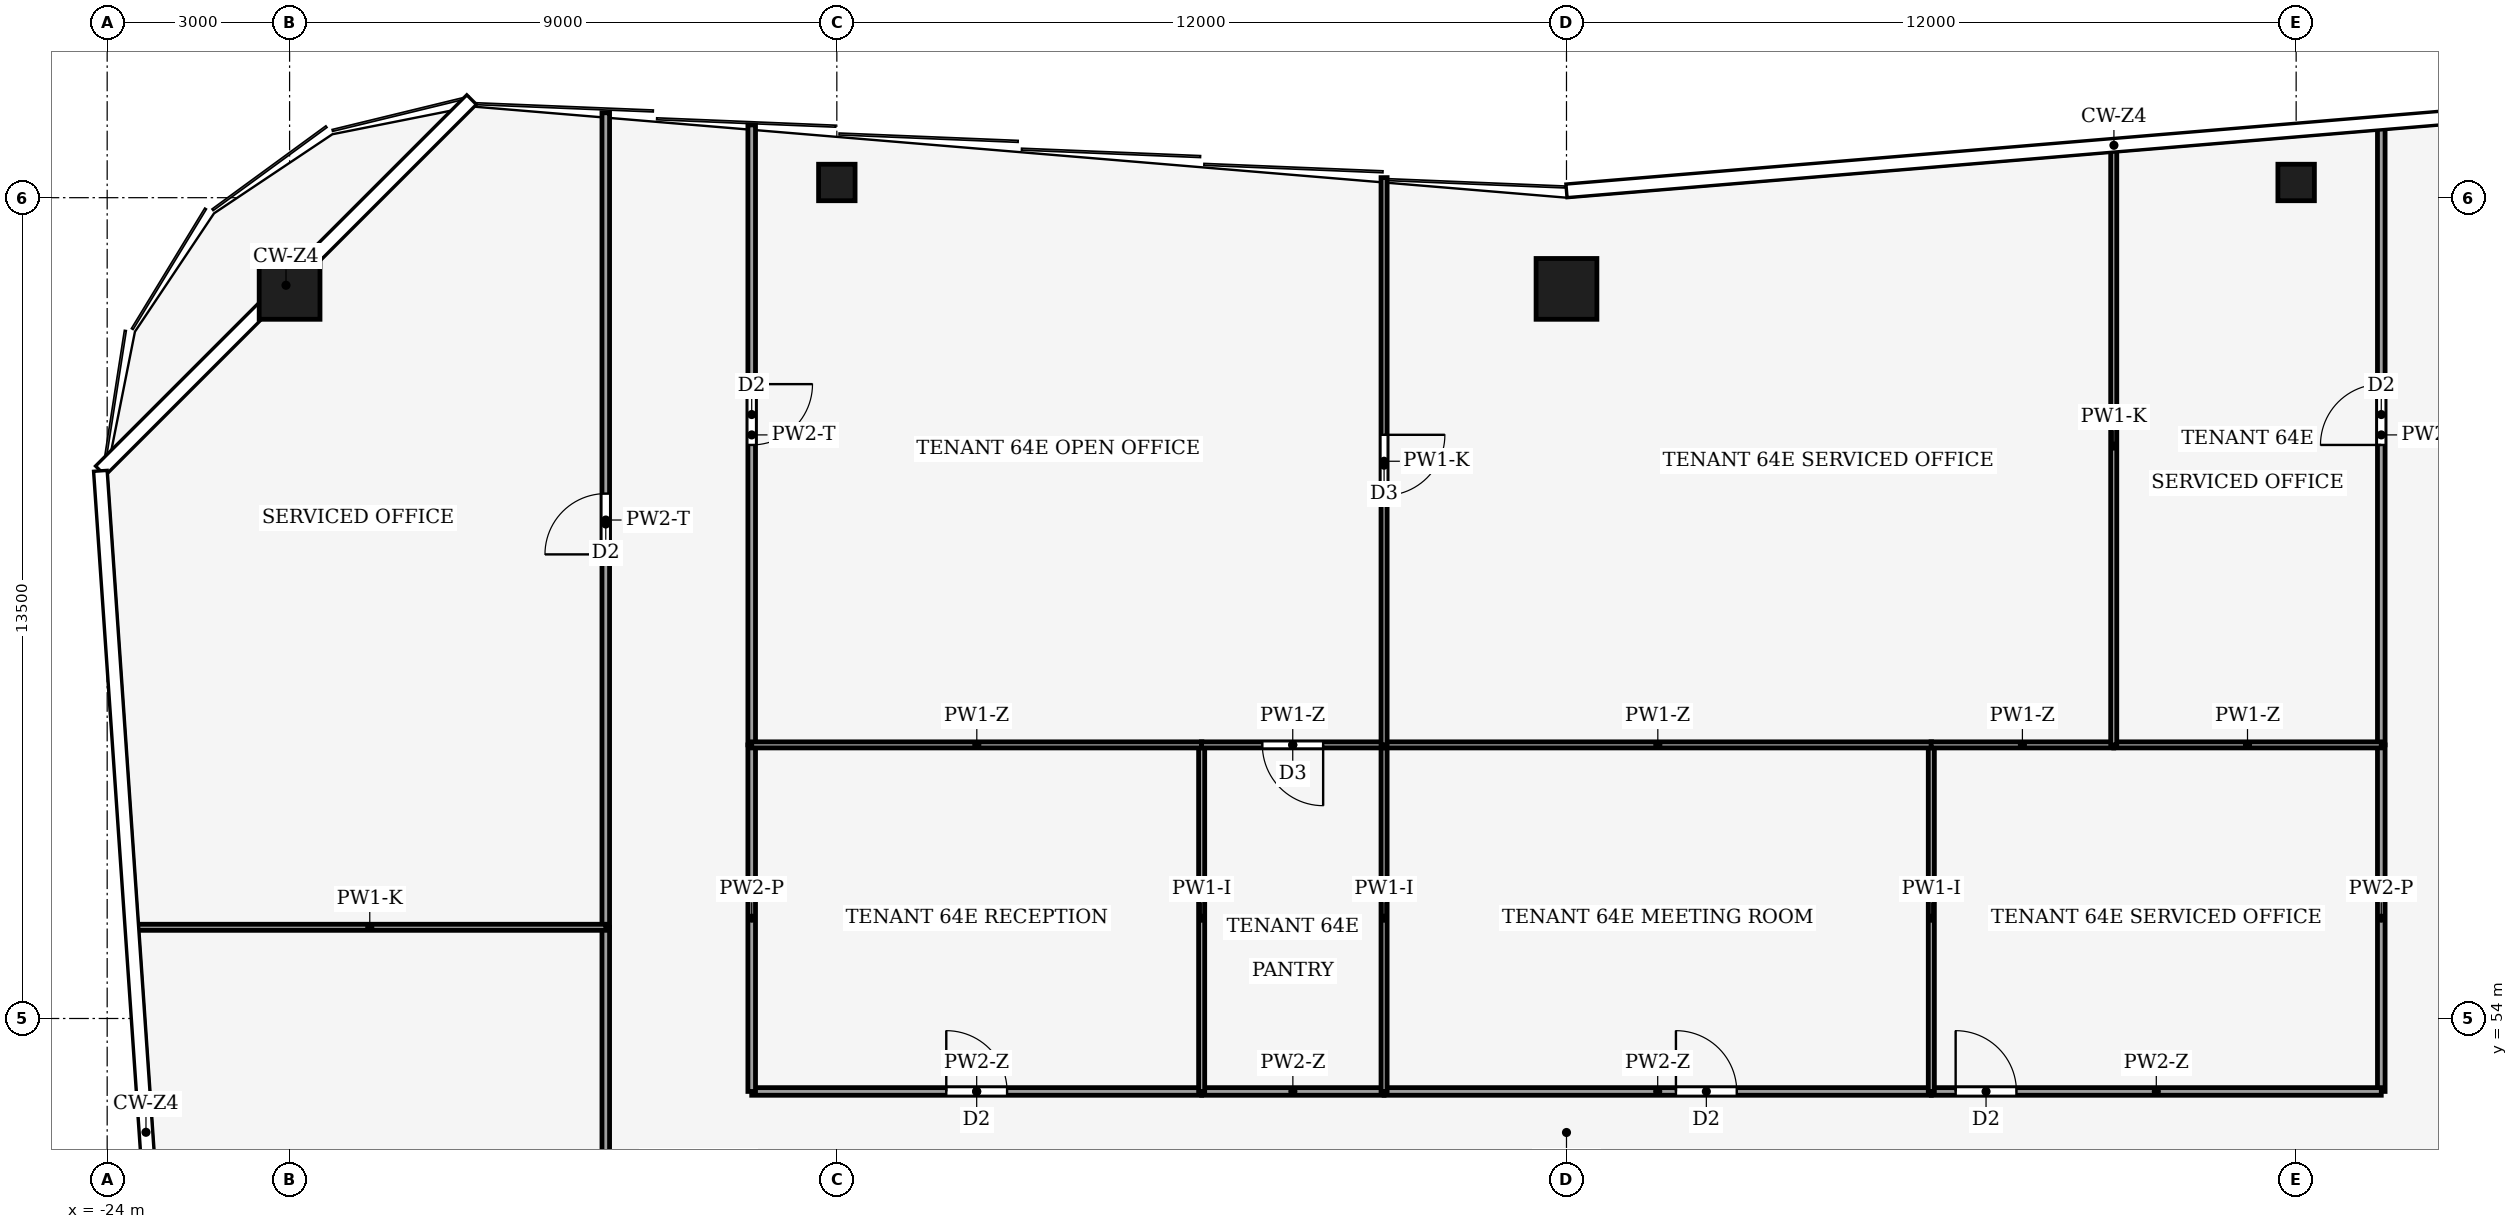
"""IFC4 building model, lengths in metres.
Left out: names, types, materials, properties, quantities, classifications, styles, units other than length and angle.
Written with IfcOpenShell. Run it as: python <this file> out.ifc"""

import sys

from ifc_helpers import new_model, si_unit, direction, frame, frame_2d, origin, origin_2d, place, context, subcontext, project, spatial, rectangle, hollow_rectangle, extrude, element, fill, save


model = new_model("IFC4")
c1 = context("Model", 3, precision=1e-05, world=origin(), true_north=direction((0.0, 1.0)))
c2 = subcontext(c1, "Body", "Model", "MODEL_VIEW")
j1 = project(units=[si_unit("LENGTHUNIT", "METRE"), si_unit("PLANEANGLEUNIT", "RADIAN")], contexts=[c1])
p1 = place(None, origin())
s1 = spatial("IfcSite", under=j1, at=p1, CompositionType="ELEMENT")
p2 = place(p1, origin())
s2 = spatial("IfcBuilding", under=s1, at=p2, CompositionType="ELEMENT")
p3 = place(p2, frame((0.0, 0.0, 278.0)))
s3 = spatial("IfcBuildingStorey", under=s2, at=p3, CompositionType="ELEMENT", Elevation=278.0)
for number, where, z_axis, x_axis in (
    (1, (-21.0, 66.0, 0.0), (0.0, 0.0, 1.0), (1.0, 0.0, 0.0)),
    (2, (0.0, 66.0, 0.0), (0.0, 0.0, 1.0), (1.0, 0.0, 0.0)),
):
    element("IfcColumn", number, at=place(p3, frame(where, z_axis=z_axis, x_axis=x_axis)), inside=s3, PredefinedType="COLUMN", context=c2, shape_type="SweptSolid", body=[
        extrude(hollow_rectangle(XDim=1.0, YDim=1.0, WallThickness=0.045, at=origin_2d()), origin(), (0.0, 0.0, 1.0), 4.0),
    ])
for number, where, z_axis, x_axis in (
    (3, (-12.0, 67.75, 0.0), (0.0, 0.0, 1.0), (1.0, 0.0, 0.0)),
    (4, (12.0, 67.75, 0.0), (0.0, 0.0, 1.0), (1.0, 0.0, 0.0)),
):
    element("IfcColumn", number, at=place(p3, frame(where, z_axis=z_axis, x_axis=x_axis)), inside=s3, PredefinedType="COLUMN", context=c2, shape_type="SweptSolid", body=[
        extrude(hollow_rectangle(XDim=0.6, YDim=0.6, WallThickness=0.025, at=origin_2d()), origin(), (0.0, 0.0, 1.0), 4.0),
    ])
p4 = place(p3, frame((-15.8, 43.5, 0.0), z_axis=(0.0, 0.0, 1.0), x_axis=(0.0, 1.0, 0.0)))
e5 = element("IfcWall", 5, at=p4, inside=s3, PredefinedType="PARTITIONING", context=c2, shape_type="SweptSolid", body=[
    extrude(rectangle(XDim=12.0, YDim=0.125, at=frame_2d((6.0, 0.0))), origin(), (0.0, 0.0, 1.0), 3.12),
])
p5 = place(p4, frame((3.9, 0.0, 0.0)))
e6 = element("IfcOpeningElement", 6, at=p5, cuts=e5, PredefinedType="OPENING", context=c2, shape_type="SweptSolid", body=[
    extrude(rectangle(XDim=1.0, YDim=2.1, at=frame_2d((0.5, 1.05))), frame((0.0, 0.073, 0.0), z_axis=(0.0, -1.0, 0.0), x_axis=(1.0, 0.0, 0.0)), (0.0, 0.0, 1.0), 0.145),
])
p6 = place(p3, frame((-15.8, 55.5, 0.0), z_axis=(0.0, 0.0, 1.0), x_axis=(0.0, 1.0, 0.0)))
e7 = element("IfcWall", 7, at=p6, inside=s3, PredefinedType="PARTITIONING", context=c2, shape_type="SweptSolid", body=[
    extrude(rectangle(XDim=13.397, YDim=0.125, at=frame_2d((6.698, 0.0))), origin(), (0.0, 0.0, 1.0), 2.92),
])
p7 = place(p6, frame((6.133, 0.0, 0.0)))
e8 = element("IfcOpeningElement", 8, at=p7, cuts=e7, PredefinedType="OPENING", context=c2, shape_type="SweptSolid", body=[
    extrude(rectangle(XDim=1.0, YDim=2.1, at=frame_2d((0.5, 1.05))), frame((0.0, 0.073, 0.0), z_axis=(0.0, -1.0, 0.0), x_axis=(1.0, 0.0, 0.0)), (0.0, 0.0, 1.0), 0.145),
])
p8 = place(p3, frame((-13.4, 52.8, 0.0), z_axis=(0.0, 0.0, 1.0), x_axis=(1.0, 0.0, 0.0)))
e9 = element("IfcWall", 9, at=p8, inside=s3, PredefinedType="PARTITIONING", context=c2, shape_type="SweptSolid", body=[
    extrude(rectangle(XDim=7.4, YDim=0.125, at=frame_2d((3.7, 0.0))), origin(), (0.0, 0.0, 1.0), 3.12),
])
p9 = place(p8, frame((3.2, 0.0, 0.0)))
e10 = element("IfcOpeningElement", 10, at=p9, cuts=e9, PredefinedType="OPENING", context=c2, shape_type="SweptSolid", body=[
    extrude(rectangle(XDim=1.0, YDim=2.1, at=frame_2d((0.5, 1.05))), frame((0.0, 0.073, 0.0), z_axis=(0.0, -1.0, 0.0), x_axis=(1.0, 0.0, 0.0)), (0.0, 0.0, 1.0), 0.145),
])
p10 = place(p3, frame((-13.4, 52.8, 0.0), z_axis=(0.0, 0.0, 1.0), x_axis=(0.0, 1.0, 0.0)))
e11 = element("IfcWall", 11, at=p10, inside=s3, PredefinedType="PARTITIONING", context=c2, shape_type="SweptSolid", body=[
    extrude(rectangle(XDim=5.7, YDim=0.125, at=frame_2d((2.85, 0.0))), origin(), (0.0, 0.0, 1.0), 3.75),
])
p11 = place(p3, frame((-3.0, 52.8, 0.0), z_axis=(0.0, 0.0, 1.0), x_axis=(-1.0, 0.0, 0.0)))
e12 = element("IfcWall", 12, at=p11, inside=s3, PredefinedType="PARTITIONING", context=c2, shape_type="SweptSolid", body=[
    extrude(rectangle(XDim=3.0, YDim=0.125, at=frame_2d((1.5, 0.0))), origin(), (0.0, 0.0, 1.0), 3.12),
])
p12 = place(p3, frame((-3.0, 52.8, 0.0), z_axis=(0.0, 0.0, 1.0), x_axis=(1.0, 0.0, 0.0)))
e13 = element("IfcWall", 13, at=p12, inside=s3, PredefinedType="PARTITIONING", context=c2, shape_type="SweptSolid", body=[
    extrude(rectangle(XDim=9.0, YDim=0.125, at=frame_2d((4.5, 0.0))), origin(), (0.0, 0.0, 1.0), 3.12),
])
p13 = place(p12, frame((4.8, 0.0, 0.0)))
e14 = element("IfcOpeningElement", 14, at=p13, cuts=e13, PredefinedType="OPENING", context=c2, shape_type="SweptSolid", body=[
    extrude(rectangle(XDim=1.0, YDim=2.1, at=frame_2d((0.5, 1.05))), frame((0.0, 0.073, 0.0), z_axis=(0.0, -1.0, 0.0), x_axis=(1.0, 0.0, 0.0)), (0.0, 0.0, 1.0), 0.145),
])
p14 = place(p3, frame((13.4, 52.8, 0.0), z_axis=(0.0, 0.0, 1.0), x_axis=(0.0, 1.0, 0.0)))
e15 = element("IfcWall", 15, at=p14, inside=s3, PredefinedType="PARTITIONING", context=c2, shape_type="SweptSolid", body=[
    extrude(rectangle(XDim=5.7, YDim=0.125, at=frame_2d((2.85, 0.0))), origin(), (0.0, 0.0, 1.0), 3.75),
])
p15 = place(p3, frame((6.0, 52.8, 0.0), z_axis=(0.0, 0.0, 1.0), x_axis=(1.0, 0.0, 0.0)))
e16 = element("IfcWall", 16, at=p15, inside=s3, PredefinedType="PARTITIONING", context=c2, shape_type="SweptSolid", body=[
    extrude(rectangle(XDim=7.4, YDim=0.125, at=frame_2d((3.7, 0.0))), origin(), (0.0, 0.0, 1.0), 3.12),
])
p16 = place(p15, frame((0.4, 0.0, 0.0)))
e17 = element("IfcOpeningElement", 17, at=p16, cuts=e16, PredefinedType="OPENING", context=c2, shape_type="SweptSolid", body=[
    extrude(rectangle(XDim=1.0, YDim=2.1, at=frame_2d((0.5, 1.05))), frame((0.0, 0.073, 0.0), z_axis=(0.0, -1.0, 0.0), x_axis=(1.0, 0.0, 0.0)), (0.0, 0.0, 1.0), 0.145),
])
p17 = place(p3, frame((-13.4, 68.697, 0.0), z_axis=(0.0, 0.0, 1.0), x_axis=(0.0, -1.0, 0.0)))
e18 = element("IfcWall", 18, at=p17, inside=s3, PredefinedType="PARTITIONING", context=c2, shape_type="SweptSolid", body=[
    extrude(rectangle(XDim=10.197, YDim=0.125, at=frame_2d((5.098, 0.0))), origin(), (0.0, 0.0, 1.0), 2.92),
])
p18 = place(p17, frame((4.263, 0.0, 0.0)))
e19 = element("IfcOpeningElement", 19, at=p18, cuts=e18, PredefinedType="OPENING", context=c2, shape_type="SweptSolid", body=[
    extrude(rectangle(XDim=1.0, YDim=2.1, at=frame_2d((0.5, 1.05))), frame((0.0, 0.073, 0.0), z_axis=(0.0, -1.0, 0.0), x_axis=(1.0, 0.0, 0.0)), (0.0, 0.0, 1.0), 0.145),
])
p19 = place(p3, frame((13.4, 58.5, 0.0), z_axis=(0.0, 0.0, 1.0), x_axis=(0.0, 1.0, 0.0)))
e20 = element("IfcWall", 20, at=p19, inside=s3, PredefinedType="PARTITIONING", context=c2, shape_type="SweptSolid", body=[
    extrude(rectangle(XDim=10.197, YDim=0.125, at=frame_2d((5.098, 0.0))), origin(), (0.0, 0.0, 1.0), 2.92),
])
p20 = place(p19, frame((4.933, 0.0, 0.0)))
e21 = element("IfcOpeningElement", 21, at=p20, cuts=e20, PredefinedType="OPENING", context=c2, shape_type="SweptSolid", body=[
    extrude(rectangle(XDim=1.0, YDim=2.1, at=frame_2d((0.5, 1.05))), frame((0.0, 0.073, 0.0), z_axis=(0.0, -1.0, 0.0), x_axis=(1.0, 0.0, 0.0)), (0.0, 0.0, 1.0), 0.145),
])
p21 = place(p3, frame((-15.8, 55.5, 0.0), z_axis=(0.0, 0.0, 1.0), x_axis=(-1.0, 0.0, 0.0)))
e22 = element("IfcWall", 22, at=p21, inside=s3, PredefinedType="PARTITIONING", context=c2, shape_type="SweptSolid", body=[
    extrude(rectangle(XDim=7.763, YDim=0.1, at=frame_2d((3.881, 0.0))), origin(), (0.0, 0.0, 1.0), 2.92),
])
p22 = place(p3, frame((-6.0, 52.8, 0.0), z_axis=(0.0, 0.0, 1.0), x_axis=(0.0, 1.0, 0.0)))
e23 = element("IfcWall", 23, at=p22, inside=s3, PredefinedType="PARTITIONING", context=c2, shape_type="SweptSolid", body=[
    extrude(rectangle(XDim=5.7, YDim=0.1, at=frame_2d((2.85, 0.0))), origin(), (0.0, 0.0, 1.0), 3.75),
])
p23 = place(p3, frame((-5.996, 58.5, 0.0), z_axis=(0.0, 0.0, 1.0), x_axis=(-1.0, 0.0, 0.0)))
e24 = element("IfcWall", 24, at=p23, inside=s3, PredefinedType="PARTITIONING", context=c2, shape_type="SweptSolid", body=[
    extrude(rectangle(XDim=7.404, YDim=0.1, at=frame_2d((3.702, 0.0))), origin(), (0.0, 0.0, 1.0), 3.12),
])
p24 = place(p3, frame((-3.0, 52.8, 0.0), z_axis=(0.0, 0.0, 1.0), x_axis=(0.0, 1.0, 0.0)))
e25 = element("IfcWall", 25, at=p24, inside=s3, PredefinedType="PARTITIONING", context=c2, shape_type="SweptSolid", body=[
    extrude(rectangle(XDim=5.7, YDim=0.1, at=frame_2d((2.85, 0.0))), origin(), (0.0, 0.0, 1.0), 3.75),
])
p25 = place(p3, frame((-3.0, 58.5, 0.0), z_axis=(0.0, 0.0, 1.0), x_axis=(-1.0, 0.0, 0.0)))
e26 = element("IfcWall", 26, at=p25, inside=s3, PredefinedType="PARTITIONING", context=c2, shape_type="SweptSolid", body=[
    extrude(rectangle(XDim=3.004, YDim=0.1, at=frame_2d((1.502, 0.0))), origin(), (0.0, 0.0, 1.0), 3.12),
])
p26 = place(p25, frame((1.002, 0.0, 0.0)))
e27 = element("IfcOpeningElement", 27, at=p26, cuts=e26, PredefinedType="OPENING", context=c2, shape_type="SweptSolid", body=[
    extrude(rectangle(XDim=1.0, YDim=2.1, at=frame_2d((0.5, 1.05))), frame((0.0, 0.06, 0.0), z_axis=(0.0, -1.0, 0.0), x_axis=(1.0, 0.0, 0.0)), (0.0, 0.0, 1.0), 0.12),
])
p27 = place(p3, frame((6.0, 52.8, 0.0), z_axis=(0.0, 0.0, 1.0), x_axis=(0.0, 1.0, 0.0)))
e28 = element("IfcWall", 28, at=p27, inside=s3, PredefinedType="PARTITIONING", context=c2, shape_type="SweptSolid", body=[
    extrude(rectangle(XDim=5.7, YDim=0.1, at=frame_2d((2.85, 0.0))), origin(), (0.0, 0.0, 1.0), 3.75),
])
p28 = place(p3, frame((6.004, 58.5, 0.0), z_axis=(0.0, 0.0, 1.0), x_axis=(-1.0, 0.0, 0.0)))
e29 = element("IfcWall", 29, at=p28, inside=s3, PredefinedType="PARTITIONING", context=c2, shape_type="SweptSolid", body=[
    extrude(rectangle(XDim=9.004, YDim=0.1, at=frame_2d((4.502, 0.0))), origin(), (0.0, 0.0, 1.0), 3.12),
])
p29 = place(p3, frame((9.0, 58.5, 0.0), z_axis=(0.0, 0.0, 1.0), x_axis=(-1.0, 0.0, 0.0)))
e30 = element("IfcWall", 30, at=p29, inside=s3, PredefinedType="PARTITIONING", context=c2, shape_type="SweptSolid", body=[
    extrude(rectangle(XDim=3.004, YDim=0.1, at=frame_2d((1.502, 0.0))), origin(), (0.0, 0.0, 1.0), 3.12),
])
p30 = place(p3, frame((13.4, 58.5, 0.0), z_axis=(0.0, 0.0, 1.0), x_axis=(-1.0, 0.0, 0.0)))
e31 = element("IfcWall", 31, at=p30, inside=s3, PredefinedType="PARTITIONING", context=c2, shape_type="SweptSolid", body=[
    extrude(rectangle(XDim=4.4, YDim=0.1, at=frame_2d((2.2, 0.0))), origin(), (0.0, 0.0, 1.0), 3.12),
])
p31 = place(p3, frame((-3.0, 67.83, 0.0), z_axis=(0.0, 0.0, 1.0), x_axis=(0.0, -1.0, 0.0)))
e32 = element("IfcWall", 32, at=p31, inside=s3, PredefinedType="PARTITIONING", context=c2, shape_type="SweptSolid", body=[
    extrude(rectangle(XDim=9.33, YDim=0.1, at=frame_2d((4.665, 0.0))), origin(), (0.0, 0.0, 1.0), 2.92),
])
p32 = place(p31, frame((4.23, 0.0, 0.0)))
e33 = element("IfcOpeningElement", 33, at=p32, cuts=e32, PredefinedType="OPENING", context=c2, shape_type="SweptSolid", body=[
    extrude(rectangle(XDim=1.0, YDim=2.1, at=frame_2d((0.5, 1.05))), frame((0.0, 0.06, 0.0), z_axis=(0.0, -1.0, 0.0), x_axis=(1.0, 0.0, 0.0)), (0.0, 0.0, 1.0), 0.12),
])
p33 = place(p3, frame((9.0, 58.5, 0.0), z_axis=(0.0, 0.0, 1.0), x_axis=(0.0, 1.0, 0.0)))
e34 = element("IfcWall", 34, at=p33, inside=s3, PredefinedType="PARTITIONING", context=c2, shape_type="SweptSolid", body=[
    extrude(rectangle(XDim=9.83, YDim=0.1, at=frame_2d((4.915, 0.0))), origin(), (0.0, 0.0, 1.0), 2.92),
])
p34 = place(p7, origin())
e35 = element("IfcDoor", 35, at=p34, inside=s3, OperationType="SINGLE_SWING_LEFT", PredefinedType="DOOR", context=c2, shape_type="SweptSolid", body=[
    extrude(rectangle(XDim=1.0, YDim=2.1, at=frame_2d((0.5, 1.05))), frame((0.0, 0.025, 0.0), z_axis=(0.0, -1.0, 0.0), x_axis=(1.0, 0.0, 0.0)), (0.0, 0.0, 1.0), 0.05),
])
fill(e8, e35)
p35 = place(p9, origin())
e36 = element("IfcDoor", 36, at=p35, inside=s3, OperationType="SINGLE_SWING_LEFT", PredefinedType="DOOR", context=c2, shape_type="SweptSolid", body=[
    extrude(rectangle(XDim=1.0, YDim=2.1, at=frame_2d((0.5, 1.05))), frame((0.0, 0.025, 0.0), z_axis=(0.0, -1.0, 0.0), x_axis=(1.0, 0.0, 0.0)), (0.0, 0.0, 1.0), 0.05),
])
fill(e10, e36)
p36 = place(p13, origin())
e37 = element("IfcDoor", 37, at=p36, inside=s3, OperationType="SINGLE_SWING_RIGHT", PredefinedType="DOOR", context=c2, shape_type="SweptSolid", body=[
    extrude(rectangle(XDim=1.0, YDim=2.1, at=frame_2d((0.5, 1.05))), frame((0.0, 0.025, 0.0), z_axis=(0.0, -1.0, 0.0), x_axis=(1.0, 0.0, 0.0)), (0.0, 0.0, 1.0), 0.05),
])
fill(e14, e37)
p37 = place(p16, origin())
e38 = element("IfcDoor", 38, at=p37, inside=s3, OperationType="SINGLE_SWING_LEFT", PredefinedType="DOOR", context=c2, shape_type="SweptSolid", body=[
    extrude(rectangle(XDim=1.0, YDim=2.1, at=frame_2d((0.5, 1.05))), frame((0.0, 0.025, 0.0), z_axis=(0.0, -1.0, 0.0), x_axis=(1.0, 0.0, 0.0)), (0.0, 0.0, 1.0), 0.05),
])
fill(e17, e38)
p38 = place(p18, origin())
e39 = element("IfcDoor", 39, at=p38, inside=s3, OperationType="SINGLE_SWING_LEFT", PredefinedType="DOOR", context=c2, shape_type="SweptSolid", body=[
    extrude(rectangle(XDim=1.0, YDim=2.1, at=frame_2d((0.5, 1.05))), frame((0.0, 0.025, 0.0), z_axis=(0.0, -1.0, 0.0), x_axis=(1.0, 0.0, 0.0)), (0.0, 0.0, 1.0), 0.05),
])
fill(e19, e39)
p39 = place(p20, origin())
e40 = element("IfcDoor", 40, at=p39, inside=s3, OperationType="SINGLE_SWING_RIGHT", PredefinedType="DOOR", context=c2, shape_type="SweptSolid", body=[
    extrude(rectangle(XDim=1.0, YDim=2.1, at=frame_2d((0.5, 1.05))), frame((0.0, 0.025, 0.0), z_axis=(0.0, -1.0, 0.0), x_axis=(1.0, 0.0, 0.0)), (0.0, 0.0, 1.0), 0.05),
])
fill(e21, e40)
p40 = place(p26, origin())
e41 = element("IfcDoor", 41, at=p40, inside=s3, OperationType="SINGLE_SWING_RIGHT", PredefinedType="DOOR", context=c2, shape_type="SweptSolid", body=[
    extrude(rectangle(XDim=1.0, YDim=2.1, at=frame_2d((0.5, 1.05))), frame((0.0, 0.025, 0.0), z_axis=(0.0, -1.0, 0.0), x_axis=(1.0, 0.0, 0.0)), (0.0, 0.0, 1.0), 0.05),
])
fill(e27, e41)
p41 = place(p32, origin())
e42 = element("IfcDoor", 42, at=p41, inside=s3, OperationType="SINGLE_SWING_RIGHT", PredefinedType="DOOR", context=c2, shape_type="SweptSolid", body=[
    extrude(rectangle(XDim=1.0, YDim=2.1, at=frame_2d((0.5, 1.05))), frame((0.0, 0.025, 0.0), z_axis=(0.0, -1.0, 0.0), x_axis=(1.0, 0.0, 0.0)), (0.0, 0.0, 1.0), 0.05),
])
fill(e33, e42)
save(model, sys.argv[1])
